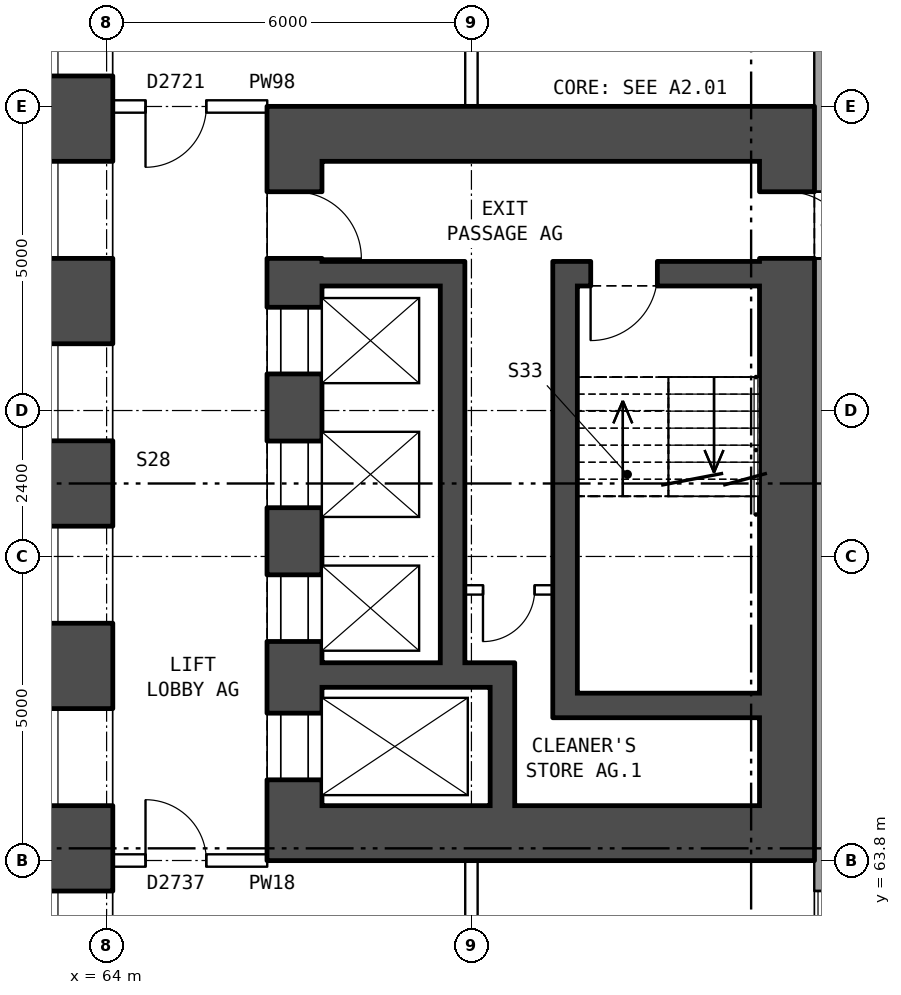
"""IFC4 building model, lengths in metres.
Left out: names, types, materials, properties, quantities, classifications, styles, units other than length and angle.
Written with IfcOpenShell. Run it as: python <this file> out.ifc"""

import sys

from ifc_helpers import new_model, si_unit, direction, frame, frame_2d, origin, place, context, subcontext, project, spatial, rectangle, extrude, element, fill, save


model = new_model("IFC4")
c1 = context("Model", 3, precision=1e-05, world=origin(), true_north=direction((0.0, 1.0)))
c2 = subcontext(c1, "Body", "Model", "MODEL_VIEW")
j1 = project(units=[si_unit("LENGTHUNIT", "METRE"), si_unit("PLANEANGLEUNIT", "RADIAN")], contexts=[c1])
p1 = place(None, origin())
s1 = spatial("IfcSite", under=j1, at=p1, CompositionType="ELEMENT")
p2 = place(p1, origin())
s2 = spatial("IfcBuilding", under=s1, at=p2, CompositionType="ELEMENT")
p3 = place(p2, origin())
s3 = spatial("IfcBuildingStorey", under=s2, at=p3, CompositionType="ELEMENT", Elevation=0.0)
p4 = place(p3, frame((63.5, 56.4, -0.35), z_axis=(0.0, 0.0, 1.0), x_axis=(0.0, 1.0, 0.0)))
e1 = element("IfcWall", 1, at=p4, inside=s3, PredefinedType="SHEAR", context=c2, shape_type="SweptSolid", body=[
    extrude(rectangle(XDim=27.2, YDim=1.2, at=frame_2d((13.6, 0.0))), origin(), (0.0, 0.0, 1.0), 5.55),
])
p5 = place(p4, frame((2.3, 0.0, 0.8)))
e2 = element("IfcOpeningElement", 2, at=p5, cuts=e1, PredefinedType="OPENING", context=c2, shape_type="SweptSolid", body=[
    extrude(rectangle(XDim=1.6, YDim=1.8, at=frame_2d((0.8, 0.9))), frame((0.0, 0.61, 0.0), z_axis=(0.0, -1.0, 0.0), x_axis=(1.0, 0.0, 0.0)), (0.0, 0.0, 1.0), 1.22),
])
p6 = place(p4, frame((5.3, 0.0, 0.8)))
e3 = element("IfcOpeningElement", 3, at=p6, cuts=e1, PredefinedType="OPENING", context=c2, shape_type="SweptSolid", body=[
    extrude(rectangle(XDim=1.6, YDim=1.8, at=frame_2d((0.8, 0.9))), frame((0.0, 0.61, 0.0), z_axis=(0.0, -1.0, 0.0), x_axis=(1.0, 0.0, 0.0)), (0.0, 0.0, 1.0), 1.22),
])
p7 = place(p4, frame((8.3, 0.0, 0.8)))
e4 = element("IfcOpeningElement", 4, at=p7, cuts=e1, PredefinedType="OPENING", context=c2, shape_type="SweptSolid", body=[
    extrude(rectangle(XDim=1.6, YDim=1.8, at=frame_2d((0.8, 0.9))), frame((0.0, 0.61, 0.0), z_axis=(0.0, -1.0, 0.0), x_axis=(1.0, 0.0, 0.0)), (0.0, 0.0, 1.0), 1.22),
])
p8 = place(p4, frame((11.3, 0.0, 0.8)))
e5 = element("IfcOpeningElement", 5, at=p8, cuts=e1, PredefinedType="OPENING", context=c2, shape_type="SweptSolid", body=[
    extrude(rectangle(XDim=1.6, YDim=1.8, at=frame_2d((0.8, 0.9))), frame((0.0, 0.61, 0.0), z_axis=(0.0, -1.0, 0.0), x_axis=(1.0, 0.0, 0.0)), (0.0, 0.0, 1.0), 1.22),
])
p9 = place(p4, frame((14.3, 0.0, 0.8)))
e6 = element("IfcOpeningElement", 6, at=p9, cuts=e1, PredefinedType="OPENING", context=c2, shape_type="SweptSolid", body=[
    extrude(rectangle(XDim=1.6, YDim=1.8, at=frame_2d((0.8, 0.9))), frame((0.0, 0.61, 0.0), z_axis=(0.0, -1.0, 0.0), x_axis=(1.0, 0.0, 0.0)), (0.0, 0.0, 1.0), 1.22),
])
p10 = place(p4, frame((17.3, 0.0, 0.8)))
e7 = element("IfcOpeningElement", 7, at=p10, cuts=e1, PredefinedType="OPENING", context=c2, shape_type="SweptSolid", body=[
    extrude(rectangle(XDim=1.6, YDim=1.8, at=frame_2d((0.8, 0.9))), frame((0.0, 0.61, 0.0), z_axis=(0.0, -1.0, 0.0), x_axis=(1.0, 0.0, 0.0)), (0.0, 0.0, 1.0), 1.22),
])
p11 = place(p4, frame((20.3, 0.0, 0.8)))
e8 = element("IfcOpeningElement", 8, at=p11, cuts=e1, PredefinedType="OPENING", context=c2, shape_type="SweptSolid", body=[
    extrude(rectangle(XDim=1.6, YDim=1.8, at=frame_2d((0.8, 0.9))), frame((0.0, 0.61, 0.0), z_axis=(0.0, -1.0, 0.0), x_axis=(1.0, 0.0, 0.0)), (0.0, 0.0, 1.0), 1.22),
])
p12 = place(p4, frame((23.3, 0.0, 0.8)))
e9 = element("IfcOpeningElement", 9, at=p12, cuts=e1, PredefinedType="OPENING", context=c2, shape_type="SweptSolid", body=[
    extrude(rectangle(XDim=1.6, YDim=1.8, at=frame_2d((0.8, 0.9))), frame((0.0, 0.61, 0.0), z_axis=(0.0, -1.0, 0.0), x_axis=(1.0, 0.0, 0.0)), (0.0, 0.0, 1.0), 1.22),
])
p13 = place(p3, frame((75.82, 57.075, 0.0), z_axis=(0.0, 0.0, 1.0), x_axis=(0.0, 1.0, 0.0)))
e10 = element("IfcWall", 10, at=p13, inside=s3, PredefinedType="STANDARD", context=c2, shape_type="SweptSolid", body=[
    extrude(rectangle(XDim=25.851, YDim=0.36, at=frame_2d((12.925, 0.0))), origin(), (0.0, 0.0, 1.0), 5.2),
])
p14 = place(p13, frame((4.625, 0.0, 0.8)))
e11 = element("IfcOpeningElement", 11, at=p14, cuts=e10, PredefinedType="OPENING", context=c2, shape_type="SweptSolid", body=[
    extrude(rectangle(XDim=1.6, YDim=1.8, at=frame_2d((0.8, 0.9))), frame((0.0, 0.19, 0.0), z_axis=(0.0, -1.0, 0.0), x_axis=(1.0, 0.0, 0.0)), (0.0, 0.0, 1.0), 0.38),
])
p15 = place(p13, frame((16.625, 0.0, 0.0)))
e12 = element("IfcOpeningElement", 12, at=p15, cuts=e10, PredefinedType="OPENING", context=c2, shape_type="SweptSolid", body=[
    extrude(rectangle(XDim=1.1, YDim=2.1, at=frame_2d((0.55, 1.05))), frame((0.0, 0.19, 0.0), z_axis=(0.0, -1.0, 0.0), x_axis=(1.0, 0.0, 0.0)), (0.0, 0.0, 1.0), 0.38),
])
p16 = place(p3, frame((67.09, 64.7, 0.0), z_axis=(0.0, 0.0, 1.0), x_axis=(0.0, 1.0, 0.0)))
e13 = element("IfcWall", 13, at=p16, inside=s3, PredefinedType="SHEAR", context=c2, shape_type="SweptSolid", body=[
    extrude(rectangle(XDim=10.6, YDim=0.9, at=frame_2d((5.3, 0.0))), origin(), (0.0, 0.0, 1.0), 5.2),
])
p17 = place(p16, frame((0.425, 0.0, 0.0)))
e14 = element("IfcOpeningElement", 14, at=p17, cuts=e13, PredefinedType="OPENING", context=c2, shape_type="SweptSolid", body=[
    extrude(rectangle(XDim=1.1, YDim=2.1, at=frame_2d((0.55, 1.05))), frame((0.0, 0.46, 0.0), z_axis=(0.0, -1.0, 0.0), x_axis=(1.0, 0.0, 0.0)), (0.0, 0.0, 1.0), 0.92),
])
p18 = place(p16, frame((2.7, 0.0, 0.0)))
e15 = element("IfcOpeningElement", 15, at=p18, cuts=e13, PredefinedType="OPENING", context=c2, shape_type="SweptSolid", body=[
    extrude(rectangle(XDim=1.1, YDim=2.1, at=frame_2d((0.55, 1.05))), frame((0.0, 0.46, 0.0), z_axis=(0.0, -1.0, 0.0), x_axis=(1.0, 0.0, 0.0)), (0.0, 0.0, 1.0), 0.92),
])
p19 = place(p16, frame((4.9, 0.0, 0.0)))
e16 = element("IfcOpeningElement", 16, at=p19, cuts=e13, PredefinedType="OPENING", context=c2, shape_type="SweptSolid", body=[
    extrude(rectangle(XDim=1.1, YDim=2.1, at=frame_2d((0.55, 1.05))), frame((0.0, 0.46, 0.0), z_axis=(0.0, -1.0, 0.0), x_axis=(1.0, 0.0, 0.0)), (0.0, 0.0, 1.0), 0.92),
])
p20 = place(p16, frame((7.1, 0.0, 0.0)))
e17 = element("IfcOpeningElement", 17, at=p20, cuts=e13, PredefinedType="OPENING", context=c2, shape_type="SweptSolid", body=[
    extrude(rectangle(XDim=1.1, YDim=2.1, at=frame_2d((0.55, 1.05))), frame((0.0, 0.46, 0.0), z_axis=(0.0, -1.0, 0.0), x_axis=(1.0, 0.0, 0.0)), (0.0, 0.0, 1.0), 0.92),
])
p21 = place(p16, frame((9.0, 0.0, 0.0)))
e18 = element("IfcOpeningElement", 18, at=p21, cuts=e13, PredefinedType="OPENING", context=c2, shape_type="SweptSolid", body=[
    extrude(rectangle(XDim=1.1, YDim=2.1, at=frame_2d((0.55, 1.05))), frame((0.0, 0.46, 0.0), z_axis=(0.0, -1.0, 0.0), x_axis=(1.0, 0.0, 0.0)), (0.0, 0.0, 1.0), 0.92),
])
p22 = place(p3, frame((75.19, 64.7, 0.0), z_axis=(0.0, 0.0, 1.0), x_axis=(0.0, 1.0, 0.0)))
e19 = element("IfcWall", 19, at=p22, inside=s3, PredefinedType="SHEAR", context=c2, shape_type="SweptSolid", body=[
    extrude(rectangle(XDim=10.6, YDim=0.9, at=frame_2d((5.3, 0.0))), origin(), (0.0, 0.0, 1.0), 5.2),
])
p23 = place(p22, frame((9.0, 0.0, 0.0)))
e20 = element("IfcOpeningElement", 20, at=p23, cuts=e19, PredefinedType="OPENING", context=c2, shape_type="SweptSolid", body=[
    extrude(rectangle(XDim=1.1, YDim=2.1, at=frame_2d((0.55, 1.05))), frame((0.0, 0.46, 0.0), z_axis=(0.0, -1.0, 0.0), x_axis=(1.0, 0.0, 0.0)), (0.0, 0.0, 1.0), 0.92),
])
for number, where, z_axis, x_axis in (
    (21, (66.64, 64.25, 0.0), (0.0, 0.0, 1.0), (1.0, 0.0, 0.0)),
    (22, (66.64, 75.75, 0.0), (0.0, 0.0, 1.0), (1.0, 0.0, 0.0)),
):
    element("IfcWall", number, at=place(p3, frame(where, z_axis=z_axis, x_axis=x_axis)), inside=s3, PredefinedType="SHEAR", context=c2, shape_type="SweptSolid", body=[
        extrude(rectangle(XDim=9.0, YDim=0.9, at=frame_2d((4.5, 0.0))), origin(), (0.0, 0.0, 1.0), 5.2),
    ])
p24 = place(p3, frame((71.74, 66.35, 0.0), z_axis=(0.0, 0.0, 1.0), x_axis=(1.0, 0.0, 0.0)))
e23 = element("IfcWall", 23, at=p24, inside=s3, PredefinedType="SHEAR", context=c2, shape_type="SweptSolid", body=[
    extrude(rectangle(XDim=3.0, YDim=0.4, at=frame_2d((1.5, 0.0))), origin(), (0.0, 0.0, 1.0), 5.2),
])
p25 = place(p3, frame((67.54, 66.85, 0.0), z_axis=(0.0, 0.0, 1.0), x_axis=(1.0, 0.0, 0.0)))
e24 = element("IfcWall", 24, at=p25, inside=s3, PredefinedType="SHEAR", context=c2, shape_type="SweptSolid", body=[
    extrude(rectangle(XDim=3.17, YDim=0.4, at=frame_2d((1.585, 0.0))), origin(), (0.0, 0.0, 1.0), 5.2),
])
p26 = place(p3, frame((69.89, 68.25, 0.0), z_axis=(0.0, 0.0, 1.0), x_axis=(1.0, 0.0, 0.0)))
e25 = element("IfcWall", 25, at=p26, inside=s3, PredefinedType="PARTITIONING", context=c2, shape_type="SweptSolid", body=[
    extrude(rectangle(XDim=1.45, YDim=0.15, at=frame_2d((0.725, 0.0))), origin(), (0.0, 0.0, 1.0), 5.2),
])
p27 = place(p26, frame((0.3, 0.0, 0.0)))
e26 = element("IfcOpeningElement", 26, at=p27, cuts=e25, PredefinedType="OPENING", context=c2, shape_type="SweptSolid", body=[
    extrude(rectangle(XDim=0.85, YDim=2.1, at=frame_2d((0.425, 1.05))), frame((0.0, 0.085, 0.0), z_axis=(0.0, -1.0, 0.0), x_axis=(1.0, 0.0, 0.0)), (0.0, 0.0, 1.0), 0.17),
])
p28 = place(p3, frame((67.54, 73.45, 0.0), z_axis=(0.0, 0.0, 1.0), x_axis=(1.0, 0.0, 0.0)))
e27 = element("IfcWall", 27, at=p28, inside=s3, PredefinedType="SHEAR", context=c2, shape_type="SweptSolid", body=[
    extrude(rectangle(XDim=1.95, YDim=0.4, at=frame_2d((0.975, 0.0))), origin(), (0.0, 0.0, 1.0), 5.2),
])
p29 = place(p3, frame((71.74, 73.45, 0.0), z_axis=(0.0, 0.0, 1.0), x_axis=(1.0, 0.0, 0.0)))
e28 = element("IfcWall", 28, at=p29, inside=s3, PredefinedType="SHEAR", context=c2, shape_type="SweptSolid", body=[
    extrude(rectangle(XDim=3.0, YDim=0.4, at=frame_2d((1.5, 0.0))), origin(), (0.0, 0.0, 1.0), 5.2),
])
p30 = place(p29, frame((0.22, 0.0, 0.0)))
e29 = element("IfcOpeningElement", 29, at=p30, cuts=e28, PredefinedType="OPENING", context=c2, shape_type="SweptSolid", body=[
    extrude(rectangle(XDim=1.1, YDim=2.1, at=frame_2d((0.55, 1.05))), frame((0.0, 0.21, 0.0), z_axis=(0.0, -1.0, 0.0), x_axis=(1.0, 0.0, 0.0)), (0.0, 0.0, 1.0), 0.42),
])
p31 = place(p3, frame((69.69, 67.05, 0.0), z_axis=(0.0, 0.0, 1.0), x_axis=(0.0, 1.0, 0.0)))
e30 = element("IfcWall", 30, at=p31, inside=s3, PredefinedType="SHEAR", context=c2, shape_type="SweptSolid", body=[
    extrude(rectangle(XDim=6.6, YDim=0.4, at=frame_2d((3.3, 0.0))), origin(), (0.0, 0.0, 1.0), 5.2),
])
p32 = place(p3, frame((70.51, 64.7, 0.0), z_axis=(0.0, 0.0, 1.0), x_axis=(0.0, 1.0, 0.0)))
e31 = element("IfcWall", 31, at=p32, inside=s3, PredefinedType="SHEAR", context=c2, shape_type="SweptSolid", body=[
    extrude(rectangle(XDim=1.95, YDim=0.4, at=frame_2d((0.975, 0.0))), origin(), (0.0, 0.0, 1.0), 5.2),
])
p33 = place(p3, frame((71.54, 66.15, 0.0), z_axis=(0.0, 0.0, 1.0), x_axis=(0.0, 1.0, 0.0)))
e32 = element("IfcWall", 32, at=p33, inside=s3, PredefinedType="SHEAR", context=c2, shape_type="SweptSolid", body=[
    extrude(rectangle(XDim=7.5, YDim=0.4, at=frame_2d((3.75, 0.0))), origin(), (0.0, 0.0, 1.0), 5.2),
])
p34 = place(p3, frame((64.1, 63.8, 0.0), z_axis=(0.0, 0.0, 1.0), x_axis=(1.0, 0.0, 0.0)))
e33 = element("IfcWall", 33, at=p34, inside=s3, PredefinedType="PARTITIONING", context=c2, shape_type="SweptSolid", body=[
    extrude(rectangle(XDim=2.54, YDim=0.2, at=frame_2d((1.27, 0.0))), origin(), (0.0, 0.0, 1.0), 5.2),
])
p35 = place(p34, frame((0.54, 0.0, 0.0)))
e34 = element("IfcOpeningElement", 34, at=p35, cuts=e33, PredefinedType="OPENING", context=c2, shape_type="SweptSolid", body=[
    extrude(rectangle(XDim=1.0, YDim=2.1, at=frame_2d((0.5, 1.05))), frame((0.0, 0.11, 0.0), z_axis=(0.0, -1.0, 0.0), x_axis=(1.0, 0.0, 0.0)), (0.0, 0.0, 1.0), 0.22),
])
p36 = place(p3, frame((64.1, 76.2, 0.0), z_axis=(0.0, 0.0, 1.0), x_axis=(1.0, 0.0, 0.0)))
e35 = element("IfcWall", 35, at=p36, inside=s3, PredefinedType="PARTITIONING", context=c2, shape_type="SweptSolid", body=[
    extrude(rectangle(XDim=2.54, YDim=0.2, at=frame_2d((1.27, 0.0))), origin(), (0.0, 0.0, 1.0), 5.2),
])
p37 = place(p36, frame((0.54, 0.0, 0.0)))
e36 = element("IfcOpeningElement", 36, at=p37, cuts=e35, PredefinedType="OPENING", context=c2, shape_type="SweptSolid", body=[
    extrude(rectangle(XDim=1.0, YDim=2.1, at=frame_2d((0.5, 1.05))), frame((0.0, 0.11, 0.0), z_axis=(0.0, -1.0, 0.0), x_axis=(1.0, 0.0, 0.0)), (0.0, 0.0, 1.0), 0.22),
])
p38 = place(p3, frame((70.0, 54.24, 0.0), z_axis=(0.0, 0.0, 1.0), x_axis=(0.0, 1.0, 0.0)))
e37 = element("IfcWall", 37, at=p38, inside=s3, PredefinedType="PARTITIONING", context=c2, shape_type="SweptSolid", body=[
    extrude(rectangle(XDim=9.56, YDim=0.2, at=frame_2d((4.78, 0.0))), origin(), (0.0, 0.0, 1.0), 5.2),
])
p39 = place(p38, frame((2.24, 0.0, 0.0)))
e38 = element("IfcOpeningElement", 38, at=p39, cuts=e37, PredefinedType="OPENING", context=c2, shape_type="SweptSolid", body=[
    extrude(rectangle(XDim=1.0, YDim=2.1, at=frame_2d((0.5, 1.05))), frame((0.0, 0.11, 0.0), z_axis=(0.0, -1.0, 0.0), x_axis=(1.0, 0.0, 0.0)), (0.0, 0.0, 1.0), 0.22),
])
p40 = place(p38, frame((6.96, 0.0, 0.0)))
e39 = element("IfcOpeningElement", 39, at=p40, cuts=e37, PredefinedType="OPENING", context=c2, shape_type="SweptSolid", body=[
    extrude(rectangle(XDim=1.0, YDim=2.1, at=frame_2d((0.5, 1.05))), frame((0.0, 0.11, 0.0), z_axis=(0.0, -1.0, 0.0), x_axis=(1.0, 0.0, 0.0)), (0.0, 0.0, 1.0), 0.22),
])
p41 = place(p3, frame((70.0, 76.2, 0.0), z_axis=(0.0, 0.0, 1.0), x_axis=(0.0, 1.0, 0.0)))
e40 = element("IfcWall", 40, at=p41, inside=s3, PredefinedType="PARTITIONING", context=c2, shape_type="SweptSolid", body=[
    extrude(rectangle(XDim=9.56, YDim=0.2, at=frame_2d((4.78, 0.0))), origin(), (0.0, 0.0, 1.0), 5.2),
])
p42 = place(p41, frame((1.6, 0.0, 0.0)))
e41 = element("IfcOpeningElement", 41, at=p42, cuts=e40, PredefinedType="OPENING", context=c2, shape_type="SweptSolid", body=[
    extrude(rectangle(XDim=1.0, YDim=2.1, at=frame_2d((0.5, 1.05))), frame((0.0, 0.11, 0.0), z_axis=(0.0, -1.0, 0.0), x_axis=(1.0, 0.0, 0.0)), (0.0, 0.0, 1.0), 0.22),
])
p43 = place(p41, frame((5.1, 0.0, 0.0)))
e42 = element("IfcOpeningElement", 42, at=p43, cuts=e40, PredefinedType="OPENING", context=c2, shape_type="SweptSolid", body=[
    extrude(rectangle(XDim=1.0, YDim=2.1, at=frame_2d((0.5, 1.05))), frame((0.0, 0.11, 0.0), z_axis=(0.0, -1.0, 0.0), x_axis=(1.0, 0.0, 0.0)), (0.0, 0.0, 1.0), 0.22),
])
p44 = place(p41, frame((7.72, 0.0, 0.0)))
e43 = element("IfcOpeningElement", 43, at=p44, cuts=e40, PredefinedType="OPENING", context=c2, shape_type="SweptSolid", body=[
    extrude(rectangle(XDim=1.0, YDim=2.1, at=frame_2d((0.5, 1.05))), frame((0.0, 0.11, 0.0), z_axis=(0.0, -1.0, 0.0), x_axis=(1.0, 0.0, 0.0)), (0.0, 0.0, 1.0), 0.22),
])
p45 = place(p14, origin())
e44 = element("IfcWindow", 44, at=p45, inside=s3, PartitioningType="SINGLE_PANEL", PredefinedType="WINDOW", context=c2, shape_type="SweptSolid", body=[
    extrude(rectangle(XDim=1.6, YDim=1.8, at=frame_2d((0.8, 0.9))), frame((0.0, 0.15, 0.0), z_axis=(0.0, -1.0, 0.0), x_axis=(1.0, 0.0, 0.0)), (0.0, 0.0, 1.0), 0.06),
])
fill(e11, e44)
p46 = place(p6, origin())
e45 = element("IfcWindow", 45, at=p46, inside=s3, PartitioningType="SINGLE_PANEL", PredefinedType="WINDOW", context=c2, shape_type="SweptSolid", body=[
    extrude(rectangle(XDim=1.6, YDim=1.8, at=frame_2d((0.8, 0.9))), frame((0.0, 0.33, 0.0), z_axis=(0.0, -1.0, 0.0), x_axis=(1.0, 0.0, 0.0)), (0.0, 0.0, 1.0), 0.06),
])
fill(e3, e45)
p47 = place(p7, origin())
e46 = element("IfcWindow", 46, at=p47, inside=s3, PartitioningType="SINGLE_PANEL", PredefinedType="WINDOW", context=c2, shape_type="SweptSolid", body=[
    extrude(rectangle(XDim=1.6, YDim=1.8, at=frame_2d((0.8, 0.9))), frame((0.0, 0.33, 0.0), z_axis=(0.0, -1.0, 0.0), x_axis=(1.0, 0.0, 0.0)), (0.0, 0.0, 1.0), 0.06),
])
fill(e4, e46)
p48 = place(p8, origin())
e47 = element("IfcWindow", 47, at=p48, inside=s3, PartitioningType="SINGLE_PANEL", PredefinedType="WINDOW", context=c2, shape_type="SweptSolid", body=[
    extrude(rectangle(XDim=1.6, YDim=1.8, at=frame_2d((0.8, 0.9))), frame((0.0, 0.33, 0.0), z_axis=(0.0, -1.0, 0.0), x_axis=(1.0, 0.0, 0.0)), (0.0, 0.0, 1.0), 0.06),
])
fill(e5, e47)
p49 = place(p9, origin())
e48 = element("IfcWindow", 48, at=p49, inside=s3, PartitioningType="SINGLE_PANEL", PredefinedType="WINDOW", context=c2, shape_type="SweptSolid", body=[
    extrude(rectangle(XDim=1.6, YDim=1.8, at=frame_2d((0.8, 0.9))), frame((0.0, 0.33, 0.0), z_axis=(0.0, -1.0, 0.0), x_axis=(1.0, 0.0, 0.0)), (0.0, 0.0, 1.0), 0.06),
])
fill(e6, e48)
p50 = place(p10, origin())
e49 = element("IfcWindow", 49, at=p50, inside=s3, PartitioningType="SINGLE_PANEL", PredefinedType="WINDOW", context=c2, shape_type="SweptSolid", body=[
    extrude(rectangle(XDim=1.6, YDim=1.8, at=frame_2d((0.8, 0.9))), frame((0.0, 0.33, 0.0), z_axis=(0.0, -1.0, 0.0), x_axis=(1.0, 0.0, 0.0)), (0.0, 0.0, 1.0), 0.06),
])
fill(e7, e49)
p51 = place(p11, origin())
e50 = element("IfcWindow", 50, at=p51, inside=s3, PartitioningType="SINGLE_PANEL", PredefinedType="WINDOW", context=c2, shape_type="SweptSolid", body=[
    extrude(rectangle(XDim=1.6, YDim=1.8, at=frame_2d((0.8, 0.9))), frame((0.0, 0.33, 0.0), z_axis=(0.0, -1.0, 0.0), x_axis=(1.0, 0.0, 0.0)), (0.0, 0.0, 1.0), 0.06),
])
fill(e8, e50)
p52 = place(p17, origin())
e51 = element("IfcDoor", 51, at=p52, inside=s3, OperationType="DOUBLE_DOOR_SLIDING", PredefinedType="DOOR", context=c2, shape_type="SweptSolid", body=[
    extrude(rectangle(XDim=1.1, YDim=2.1, at=frame_2d((0.55, 1.05))), frame((0.0, -0.385, 0.0), z_axis=(0.0, -1.0, 0.0), x_axis=(1.0, 0.0, 0.0)), (0.0, 0.0, 1.0), 0.05),
])
fill(e14, e51)
p53 = place(p18, origin())
e52 = element("IfcDoor", 52, at=p53, inside=s3, OperationType="DOUBLE_DOOR_SLIDING", PredefinedType="DOOR", context=c2, shape_type="SweptSolid", body=[
    extrude(rectangle(XDim=1.1, YDim=2.1, at=frame_2d((0.55, 1.05))), frame((0.0, -0.385, 0.0), z_axis=(0.0, -1.0, 0.0), x_axis=(1.0, 0.0, 0.0)), (0.0, 0.0, 1.0), 0.05),
])
fill(e15, e52)
p54 = place(p19, origin())
e53 = element("IfcDoor", 53, at=p54, inside=s3, OperationType="DOUBLE_DOOR_SLIDING", PredefinedType="DOOR", context=c2, shape_type="SweptSolid", body=[
    extrude(rectangle(XDim=1.1, YDim=2.1, at=frame_2d((0.55, 1.05))), frame((0.0, -0.385, 0.0), z_axis=(0.0, -1.0, 0.0), x_axis=(1.0, 0.0, 0.0)), (0.0, 0.0, 1.0), 0.05),
])
fill(e16, e53)
p55 = place(p20, origin())
e54 = element("IfcDoor", 54, at=p55, inside=s3, OperationType="DOUBLE_DOOR_SLIDING", PredefinedType="DOOR", context=c2, shape_type="SweptSolid", body=[
    extrude(rectangle(XDim=1.1, YDim=2.1, at=frame_2d((0.55, 1.05))), frame((0.0, -0.385, 0.0), z_axis=(0.0, -1.0, 0.0), x_axis=(1.0, 0.0, 0.0)), (0.0, 0.0, 1.0), 0.05),
])
fill(e17, e54)
p56 = place(p21, frame((1.1, 0.0, 0.0), z_axis=(0.0, 0.0, 1.0), x_axis=(-1.0, 0.0, 0.0)))
e55 = element("IfcDoor", 55, at=p56, inside=s3, OperationType="SINGLE_SWING_RIGHT", PredefinedType="DOOR", context=c2, shape_type="SweptSolid", body=[
    extrude(rectangle(XDim=1.1, YDim=2.1, at=frame_2d((0.55, 1.05))), frame((0.0, 0.025, 0.0), z_axis=(0.0, -1.0, 0.0), x_axis=(1.0, 0.0, 0.0)), (0.0, 0.0, 1.0), 0.05),
])
fill(e18, e55)
p57 = place(p30, frame((1.1, 0.0, 0.0), z_axis=(0.0, 0.0, 1.0), x_axis=(-1.0, 0.0, 0.0)))
e56 = element("IfcDoor", 56, at=p57, inside=s3, OperationType="SINGLE_SWING_RIGHT", PredefinedType="DOOR", context=c2, shape_type="SweptSolid", body=[
    extrude(rectangle(XDim=1.1, YDim=2.1, at=frame_2d((0.55, 1.05))), frame((0.0, 0.025, 0.0), z_axis=(0.0, -1.0, 0.0), x_axis=(1.0, 0.0, 0.0)), (0.0, 0.0, 1.0), 0.05),
])
fill(e29, e56)
p58 = place(p27, frame((0.85, 0.0, 0.0), z_axis=(0.0, 0.0, 1.0), x_axis=(-1.0, 0.0, 0.0)))
e57 = element("IfcDoor", 57, at=p58, inside=s3, OperationType="SINGLE_SWING_RIGHT", PredefinedType="DOOR", context=c2, shape_type="SweptSolid", body=[
    extrude(rectangle(XDim=0.85, YDim=2.1, at=frame_2d((0.425, 1.05))), frame((0.0, 0.025, 0.0), z_axis=(0.0, -1.0, 0.0), x_axis=(1.0, 0.0, 0.0)), (0.0, 0.0, 1.0), 0.05),
])
fill(e26, e57)
p59 = place(p23, frame((1.1, 0.0, 0.0), z_axis=(0.0, 0.0, 1.0), x_axis=(-1.0, 0.0, 0.0)))
e58 = element("IfcDoor", 58, at=p59, inside=s3, OperationType="SINGLE_SWING_RIGHT", PredefinedType="DOOR", context=c2, shape_type="SweptSolid", body=[
    extrude(rectangle(XDim=1.1, YDim=2.1, at=frame_2d((0.55, 1.05))), frame((0.0, -0.385, 0.0), z_axis=(0.0, -1.0, 0.0), x_axis=(1.0, 0.0, 0.0)), (0.0, 0.0, 1.0), 0.05),
])
fill(e20, e58)
p60 = place(p35, origin())
e59 = element("IfcDoor", 59, at=p60, inside=s3, OperationType="SINGLE_SWING_LEFT", PredefinedType="DOOR", context=c2, shape_type="SweptSolid", body=[
    extrude(rectangle(XDim=1.0, YDim=2.1, at=frame_2d((0.5, 1.05))), frame((0.0, 0.025, 0.0), z_axis=(0.0, -1.0, 0.0), x_axis=(1.0, 0.0, 0.0)), (0.0, 0.0, 1.0), 0.05),
])
fill(e34, e59)
p61 = place(p37, frame((1.0, 0.0, 0.0), z_axis=(0.0, 0.0, 1.0), x_axis=(-1.0, 0.0, 0.0)))
e60 = element("IfcDoor", 60, at=p61, inside=s3, OperationType="SINGLE_SWING_RIGHT", PredefinedType="DOOR", context=c2, shape_type="SweptSolid", body=[
    extrude(rectangle(XDim=1.0, YDim=2.1, at=frame_2d((0.5, 1.05))), frame((0.0, 0.025, 0.0), z_axis=(0.0, -1.0, 0.0), x_axis=(1.0, 0.0, 0.0)), (0.0, 0.0, 1.0), 0.05),
])
fill(e36, e60)
save(model, sys.argv[1])
